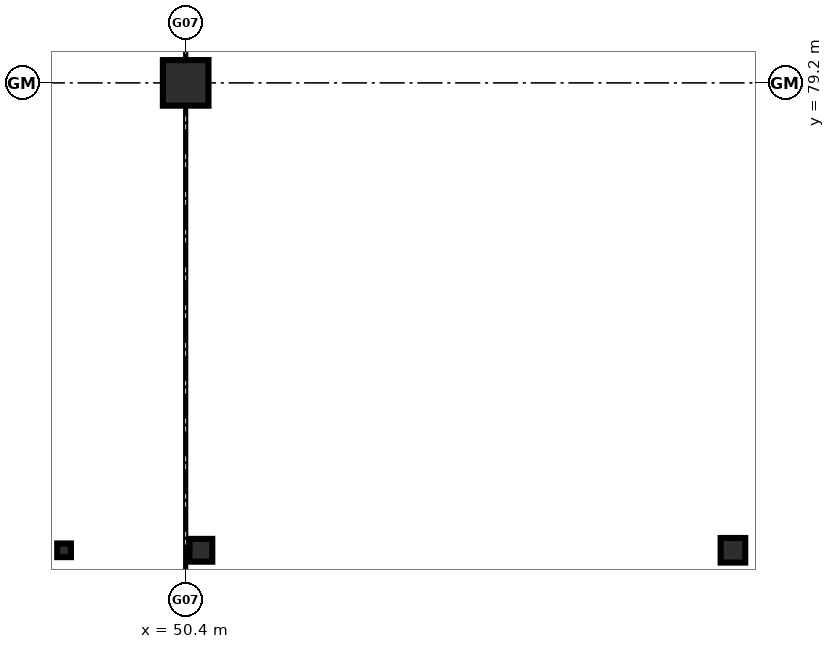
"""IFC4 building model, lengths in metres.
Left out: names, types, materials, properties, quantities, classifications, styles, units other than length and angle.
Written with IfcOpenShell. Run it as: python <this file> out.ifc"""

import sys

from ifc_helpers import new_model, si_unit, direction, frame, origin, origin_2d, place, context, subcontext, project, spatial, rectangle, hollow_rectangle, hollow_circle, i_section, extrude, element, save


model = new_model("IFC4")
c1 = context("Model", 3, precision=1e-05, world=origin(), true_north=direction((0.0, 1.0)))
c2 = subcontext(c1, "Body", "Model", "MODEL_VIEW")
j1 = project(units=[si_unit("LENGTHUNIT", "METRE"), si_unit("PLANEANGLEUNIT", "RADIAN")], contexts=[c1])
p1 = place(None, origin())
s1 = spatial("IfcSite", under=j1, at=p1, CompositionType="ELEMENT")
p2 = place(p1, origin())
s2 = spatial("IfcBuilding", under=s1, at=p2, CompositionType="ELEMENT")
p3 = place(p2, frame((0.0, 0.0, -4.8)))
s3 = spatial("IfcBuildingStorey", under=s2, at=p3, CompositionType="ELEMENT", Elevation=-4.8)
p4 = place(p3, frame((50.4, 79.2, 0.0), z_axis=(0.0, 0.0, 1.0), x_axis=(1.0, 0.0, 0.0)))
e1 = element("IfcColumn", 1, at=p4, inside=s3, PredefinedType="COLUMN", context=c2, shape_type="SweptSolid", body=[
    extrude(rectangle(XDim=0.6, YDim=0.6, at=origin_2d()), origin(), (0.0, 0.0, 1.0), 4.8),
])
p5 = place(p3, frame((57.6, 73.05, 0.0), z_axis=(0.0, 0.0, 1.0), x_axis=(1.0, 0.0, 0.0)))
e2 = element("IfcColumn", 2, at=p5, inside=s3, PredefinedType="COLUMN", context=c2, shape_type="SweptSolid", body=[
    extrude(hollow_circle(Radius=0.162, WallThickness=0.012, at=origin_2d()), origin(), (0.0, 0.0, 1.0), 4.8),
])
p6 = place(p3, frame((50.6, 73.05, 0.0), z_axis=(0.0, 0.0, 1.0), x_axis=(1.0, 0.0, 0.0)))
e3 = element("IfcColumn", 3, at=p6, inside=s3, PredefinedType="COLUMN", context=c2, shape_type="SweptSolid", body=[
    extrude(i_section(OverallWidth=0.3, OverallDepth=0.3, WebThickness=0.011, FlangeThickness=0.019, FilletRadius=0.027, at=origin_2d()), origin(), (0.0, 0.0, 1.0), 4.8),
])
p7 = place(p3, frame((48.8, 73.05, 0.0), z_axis=(0.0, 0.0, 1.0), x_axis=(1.0, 0.0, 0.0)))
e4 = element("IfcColumn", 4, at=p7, inside=s3, PredefinedType="COLUMN", context=c2, shape_type="SweptSolid", body=[
    extrude(hollow_rectangle(XDim=0.18, YDim=0.18, WallThickness=0.008, at=origin_2d()), origin(), (0.0, 0.0, 1.0), 4.8),
])
save(model, sys.argv[1])
